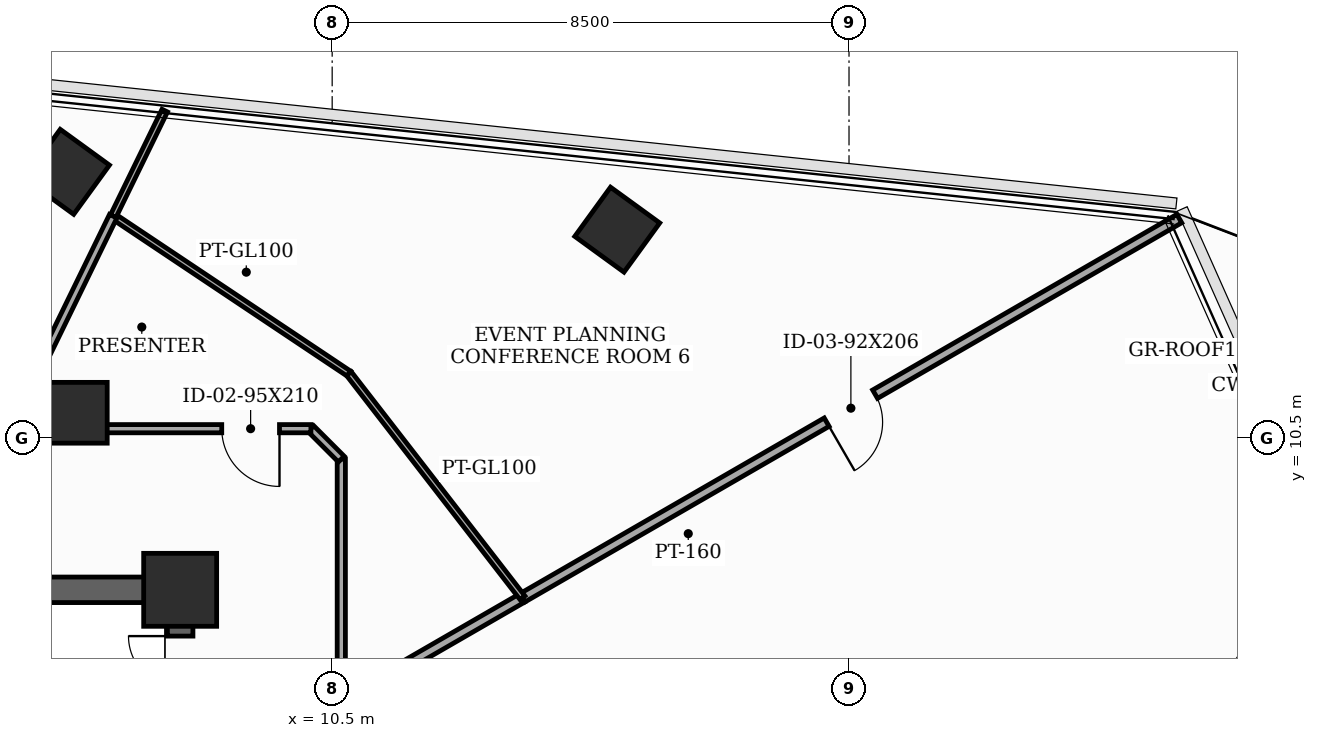
"""IFC4 building model, lengths in metres.
Left out: names, types, materials, properties, quantities, classifications, styles, units other than length and angle.
Written with IfcOpenShell. Run it as: python <this file> out.ifc"""

import sys

from ifc_helpers import new_model, si_unit, direction, frame, frame_2d, origin, origin_2d, place, context, subcontext, project, spatial, rectangle, extrude, element, fill, save


model = new_model("IFC4")
c1 = context("Model", 3, precision=1e-05, world=origin(), true_north=direction((0.0, 1.0)))
c2 = subcontext(c1, "Body", "Model", "MODEL_VIEW")
j1 = project(units=[si_unit("LENGTHUNIT", "METRE"), si_unit("PLANEANGLEUNIT", "RADIAN")], contexts=[c1])
p1 = place(None, origin())
s1 = spatial("IfcSite", under=j1, at=p1, CompositionType="ELEMENT")
p2 = place(p1, origin())
s2 = spatial("IfcBuilding", under=s1, at=p2, CompositionType="ELEMENT")
p3 = place(p2, frame((0.0, 0.0, 244.8)))
s3 = spatial("IfcBuildingStorey", under=s2, at=p3, CompositionType="ELEMENT", Elevation=244.8)
p4 = place(p3, frame((8.0, 8.0, 0.0), z_axis=(0.0, 0.0, 1.0), x_axis=(1.0, 0.0, 0.0)))
e1 = element("IfcColumn", 1, at=p4, inside=s3, PredefinedType="COLUMN", context=c2, shape_type="SweptSolid", body=[
    extrude(rectangle(XDim=1.2, YDim=1.2, at=origin_2d()), origin(), (0.0, 0.0, 1.0), 3.7),
])
for number, where, z_axis, x_axis in (
    (2, (6.3, 10.912, 0.0), (0.0, 0.0, 1.0), (1.0, 0.0, 0.0)),
    (3, (15.188, 13.923, 0.0), (0.0, 0.0, 1.0), (0.588, 0.809, 0.0)),
    (4, (6.138, 14.875, 0.0), (0.0, 0.0, 1.0), (0.588, 0.809, 0.0)),
):
    element("IfcColumn", number, at=place(p3, frame(where, z_axis=z_axis, x_axis=x_axis)), inside=s3, PredefinedType="COLUMN", context=c2, shape_type="SweptSolid", body=[
        extrude(rectangle(XDim=1.0, YDim=1.0, at=origin_2d()), origin(), (0.0, 0.0, 1.0), 3.7),
    ])
p5 = place(p3, frame((8.0, -8.0, 0.0), z_axis=(0.0, 0.0, 1.0), x_axis=(0.0, 1.0, 0.0)))
e5 = element("IfcWall", 5, at=p5, inside=s3, PredefinedType="SHEAR", context=c2, shape_type="SweptSolid", body=[
    extrude(rectangle(XDim=16.0, YDim=0.42, at=frame_2d((8.0, 0.0))), origin(), (0.0, 0.0, 1.0), 3.5),
])
p6 = place(p5, frame((9.6, 0.0, 0.0)))
e6 = element("IfcOpeningElement", 6, at=p6, cuts=e5, PredefinedType="OPENING", context=c2, shape_type="SweptSolid", body=[
    extrude(rectangle(XDim=1.05, YDim=2.15, at=frame_2d((0.525, 1.075))), frame((0.0, 0.22, 0.0), z_axis=(0.0, -1.0, 0.0), x_axis=(1.0, 0.0, 0.0)), (0.0, 0.0, 1.0), 0.44),
])
p7 = place(p5, frame((14.389, 0.0, 0.0)))
e7 = element("IfcOpeningElement", 7, at=p7, cuts=e5, PredefinedType="OPENING", context=c2, shape_type="SweptSolid", body=[
    extrude(rectangle(XDim=0.85, YDim=2.02, at=frame_2d((0.425, 1.01))), frame((0.0, 0.22, 0.0), z_axis=(0.0, -1.0, 0.0), x_axis=(1.0, 0.0, 0.0)), (0.0, 0.0, 1.0), 0.44),
])
p8 = place(p3, frame((-8.0, 8.0, 0.0), z_axis=(0.0, 0.0, 1.0), x_axis=(1.0, 0.0, 0.0)))
e8 = element("IfcWall", 8, at=p8, inside=s3, PredefinedType="SHEAR", context=c2, shape_type="SweptSolid", body=[
    extrude(rectangle(XDim=16.0, YDim=0.42, at=frame_2d((8.0, 0.0))), origin(), (0.0, 0.0, 1.0), 3.5),
])
p9 = place(p8, frame((7.1, 0.0, 0.0)))
e9 = element("IfcOpeningElement", 9, at=p9, cuts=e8, PredefinedType="OPENING", context=c2, shape_type="SweptSolid", body=[
    extrude(rectangle(XDim=1.8, YDim=2.15, at=frame_2d((0.9, 1.075))), frame((0.0, 0.22, 0.0), z_axis=(0.0, -1.0, 0.0), x_axis=(1.0, 0.0, 0.0)), (0.0, 0.0, 1.0), 0.44),
])
p10 = place(p3, frame((10.65, 6.149, 0.0), z_axis=(0.0, 0.0, 1.0), x_axis=(0.0, 1.0, 0.0)))
e10 = element("IfcWall", 10, at=p10, inside=s3, PredefinedType="PARTITIONING", context=c2, shape_type="SweptSolid", body=[
    extrude(rectangle(XDim=4.001, YDim=0.135, at=frame_2d((2.0, 0.0))), origin(), (0.0, 0.0, 1.0), 2.085),
])
p11 = place(p3, frame((10.65, 10.15, 0.0), z_axis=(0.0, 0.0, 1.0), x_axis=(-0.707106781187, 0.707106781187, 0.0)))
e11 = element("IfcWall", 11, at=p11, inside=s3, PredefinedType="PARTITIONING", context=c2, shape_type="SweptSolid", body=[
    extrude(rectangle(XDim=0.707, YDim=0.135, at=frame_2d((0.354, 0.0))), origin(), (0.0, 0.0, 1.0), 3.5),
])
p12 = place(p3, frame((10.15, 10.65, 0.0), z_axis=(0.0, 0.0, 1.0), x_axis=(-1.0, 0.0, 0.0)))
e12 = element("IfcWall", 12, at=p12, inside=s3, PredefinedType="PARTITIONING", context=c2, shape_type="SweptSolid", body=[
    extrude(rectangle(XDim=4.956, YDim=0.135, at=frame_2d((2.478, 0.0))), origin(), (0.0, 0.0, 1.0), 2.885),
])
p13 = place(p12, frame((0.516, 0.0, 0.0)))
e13 = element("IfcOpeningElement", 13, at=p13, cuts=e12, PredefinedType="OPENING", context=c2, shape_type="SweptSolid", body=[
    extrude(rectangle(XDim=0.95, YDim=2.1, at=frame_2d((0.475, 1.05))), frame((0.0, 0.077, 0.0), z_axis=(0.0, -1.0, 0.0), x_axis=(1.0, 0.0, 0.0)), (0.0, 0.0, 1.0), 0.155),
])
p14 = place(p3, frame((24.432, 14.106, 0.0), z_axis=(0.0, 0.0, 1.0), x_axis=(-0.866010870421, -0.500025171679, 0.0)))
e14 = element("IfcWall", 14, at=p14, inside=s3, PredefinedType="PARTITIONING", context=c2, shape_type="SweptSolid", body=[
    extrude(rectangle(XDim=12.473, YDim=0.16, at=frame_2d((6.236, 0.0))), origin(), (0.0, 0.0, 1.0), 2.085),
])
p15 = place(p14, frame((5.776, 0.0, 0.0)))
e15 = element("IfcOpeningElement", 15, at=p15, cuts=e14, PredefinedType="OPENING", context=c2, shape_type="SweptSolid", body=[
    extrude(rectangle(XDim=0.92, YDim=2.035, at=frame_2d((0.46, 1.018))), frame((0.0, 0.09, 0.0), z_axis=(0.0, -1.0, 0.0), x_axis=(1.0, 0.0, 0.0)), (0.0, 0.0, 1.0), 0.18),
])
p16 = place(p3, frame((13.63, 7.869, 0.0), z_axis=(0.0, 0.0, 1.0), x_axis=(-0.866091067331, -0.499886250151, 0.0)))
e16 = element("IfcWall", 16, at=p16, inside=s3, PredefinedType="PARTITIONING", context=c2, shape_type="SweptSolid", body=[
    extrude(rectangle(XDim=3.441, YDim=0.16, at=frame_2d((1.72, 0.0))), origin(), (0.0, 0.0, 1.0), 2.085),
])
p17 = place(p3, frame((6.899, 14.145, 0.0), z_axis=(0.0, 0.0, 1.0), x_axis=(0.831510168033, -0.555509532283, 0.0)))
e17 = element("IfcWall", 17, at=p17, inside=s3, PredefinedType="MOVABLE", context=c2, shape_type="SweptSolid", body=[
    extrude(rectangle(XDim=4.663, YDim=0.1, at=frame_2d((2.331, 0.0))), origin(), (0.0, 0.0, 1.0), 3.5),
])
p18 = place(p3, frame((10.776, 11.555, 0.0), z_axis=(0.0, 0.0, 1.0), x_axis=(0.612213330569, -0.790692631731, 0.0)))
e18 = element("IfcWall", 18, at=p18, inside=s3, PredefinedType="MOVABLE", context=c2, shape_type="SweptSolid", body=[
    extrude(rectangle(XDim=4.662, YDim=0.1, at=frame_2d((2.331, 0.0))), origin(), (0.0, 0.0, 1.0), 2.085),
])
p19 = place(p3, frame((7.747, 15.882, 0.0), z_axis=(0.0, 0.0, 1.0), x_axis=(-0.438553034404, -0.898705310998, 0.0)))
e19 = element("IfcWall", 19, at=p19, inside=s3, PredefinedType="MOVABLE", context=c2, shape_type="SweptSolid", body=[
    extrude(rectangle(XDim=1.933, YDim=0.1, at=frame_2d((0.966, 0.0))), origin(), (0.0, 0.0, 1.0), 2.085),
])
p20 = place(p3, frame((6.899, 14.145, 0.0), z_axis=(0.0, 0.0, 1.0), x_axis=(-0.438402604201, -0.898778702813, 0.0)))
e20 = element("IfcWall", 20, at=p20, inside=s3, PredefinedType="PARTITIONING", context=c2, shape_type="SweptSolid", body=[
    extrude(rectangle(XDim=3.889, YDim=0.135, at=frame_2d((1.944, 0.0))), origin(), (0.0, 0.0, 1.0), 2.085),
])
p21 = place(p7, origin())
e21 = element("IfcDoor", 21, at=p21, inside=s3, OperationType="SINGLE_SWING_RIGHT", PredefinedType="TRAPDOOR", context=c2, shape_type="SweptSolid", body=[
    extrude(rectangle(XDim=0.85, YDim=2.02, at=frame_2d((0.425, 1.01))), frame((0.0, 0.025, 0.0), z_axis=(0.0, -1.0, 0.0), x_axis=(1.0, 0.0, 0.0)), (0.0, 0.0, 1.0), 0.05),
])
fill(e7, e21)
p22 = place(p13, origin())
e22 = element("IfcDoor", 22, at=p22, inside=s3, OperationType="SINGLE_SWING_LEFT", PredefinedType="DOOR", context=c2, shape_type="SweptSolid", body=[
    extrude(rectangle(XDim=0.95, YDim=2.1, at=frame_2d((0.475, 1.05))), frame((0.0, 0.025, 0.0), z_axis=(0.0, -1.0, 0.0), x_axis=(1.0, 0.0, 0.0)), (0.0, 0.0, 1.0), 0.05),
])
fill(e13, e22)
p23 = place(p15, origin())
e23 = element("IfcDoor", 23, at=p23, inside=s3, OperationType="SINGLE_SWING_RIGHT", PredefinedType="DOOR", context=c2, shape_type="SweptSolid", body=[
    extrude(rectangle(XDim=0.92, YDim=2.035, at=frame_2d((0.46, 1.018))), frame((0.0, 0.025, 0.0), z_axis=(0.0, -1.0, 0.0), x_axis=(1.0, 0.0, 0.0)), (0.0, 0.0, 1.0), 0.05),
])
fill(e15, e23)
save(model, sys.argv[1])
